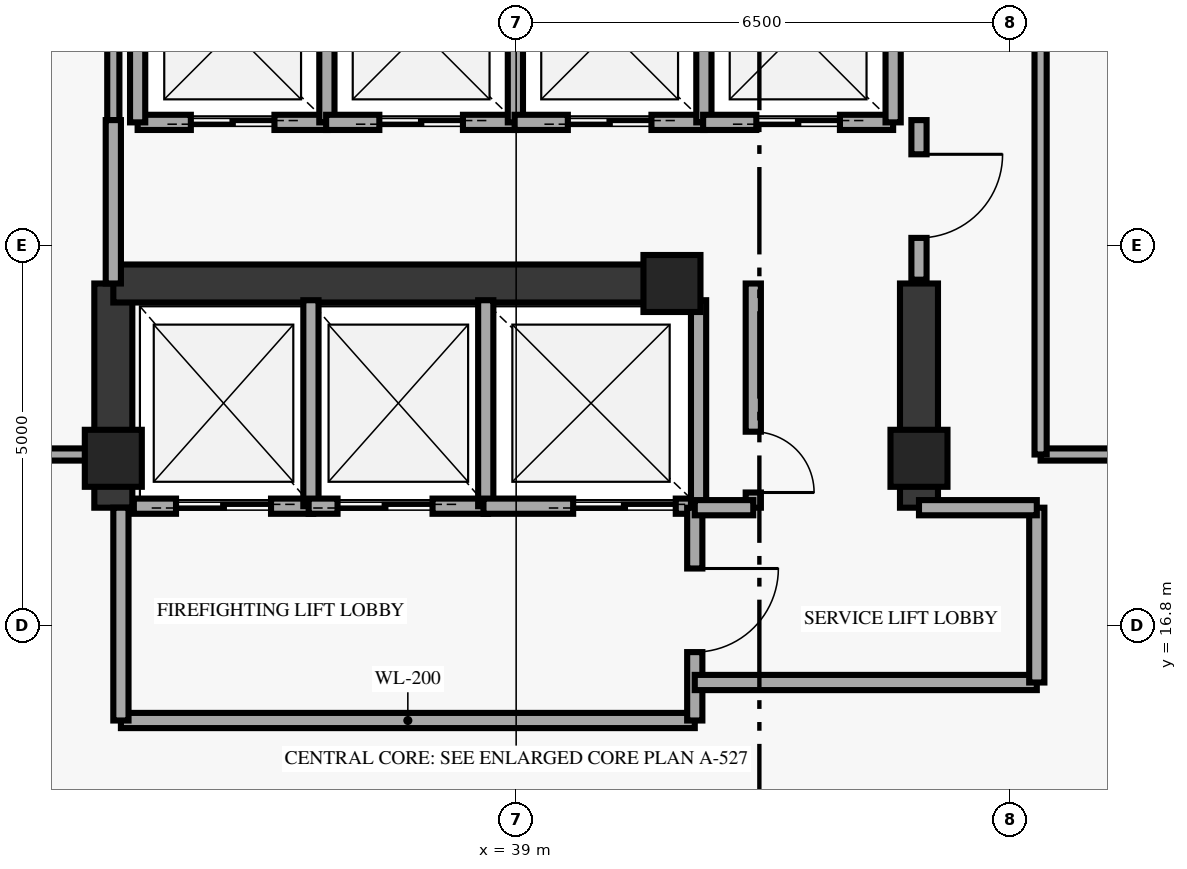
"""IFC4 building model, lengths in metres.
Left out: names, types, materials, properties, quantities, classifications, styles, units other than length and angle.
Written with IfcOpenShell. Run it as: python <this file> out.ifc"""

import sys

from ifc_helpers import new_model, si_unit, direction, frame, frame_2d, origin, origin_2d, place, context, subcontext, project, spatial, rectangle, extrude, element, fill, save


model = new_model("IFC4")
c1 = context("Model", 3, precision=1e-05, world=origin(), true_north=direction((0.0, 1.0)))
c2 = subcontext(c1, "Body", "Model", "MODEL_VIEW")
j1 = project(units=[si_unit("LENGTHUNIT", "METRE"), si_unit("PLANEANGLEUNIT", "RADIAN")], contexts=[c1])
p1 = place(None, origin())
s1 = spatial("IfcSite", under=j1, at=p1, CompositionType="ELEMENT")
p2 = place(p1, origin())
s2 = spatial("IfcBuilding", under=s1, at=p2, CompositionType="ELEMENT")
p3 = place(p2, frame((0.0, 0.0, 301.2)))
s3 = spatial("IfcBuildingStorey", under=s2, at=p3, CompositionType="ELEMENT", Elevation=301.2)
for number, where, z_axis, x_axis in (
    (1, (33.7, 19.0, 0.0), (0.0, 0.0, 1.0), (1.0, 0.0, 0.0)),
    (2, (41.05, 21.3, 0.0), (0.0, 0.0, 1.0), (1.0, 0.0, 0.0)),
    (3, (44.3, 19.0, 0.0), (0.0, 0.0, 1.0), (1.0, 0.0, 0.0)),
):
    element("IfcColumn", number, at=place(p3, frame(where, z_axis=z_axis, x_axis=x_axis)), inside=s3, PredefinedType="PILASTER", context=c2, shape_type="SweptSolid", body=[
        extrude(rectangle(XDim=0.75, YDim=0.75, at=origin_2d()), origin(), (0.0, 0.0, 1.0), 5.25),
    ])
for number, where, z_axis, x_axis in (
    (4, (33.7, 18.35, 0.0), (0.0, 0.0, 1.0), (0.0, 1.0, 0.0)),
    (5, (44.3, 18.35, 0.0), (0.0, 0.0, 1.0), (0.0, 1.0, 0.0)),
):
    element("IfcWall", number, at=place(p3, frame(where, z_axis=z_axis, x_axis=x_axis)), inside=s3, PredefinedType="SHEAR", context=c2, shape_type="SweptSolid", body=[
        extrude(rectangle(XDim=2.95, YDim=0.5, at=frame_2d((1.475, 0.0))), origin(), (0.0, 0.0, 1.0), 5.25),
    ])
p4 = place(p3, frame((33.7, 21.3, 0.0), z_axis=(0.0, 0.0, 1.0), x_axis=(1.0, 0.0, 0.0)))
e6 = element("IfcWall", 6, at=p4, inside=s3, PredefinedType="SHEAR", context=c2, shape_type="SweptSolid", body=[
    extrude(rectangle(XDim=7.55, YDim=0.5, at=frame_2d((3.775, 0.0))), origin(), (0.0, 0.0, 1.0), 5.25),
])
p5 = place(p3, frame((34.02, 23.42, 0.0), z_axis=(0.0, 0.0, 1.0), x_axis=(1.0, 0.0, 0.0)))
e7 = element("IfcWall", 7, at=p5, inside=s3, PredefinedType="SOLIDWALL", context=c2, shape_type="SweptSolid", body=[
    extrude(rectangle(XDim=2.5, YDim=0.2, at=frame_2d((1.25, 0.0))), origin(), (0.0, 0.0, 1.0), 5.25),
])
p6 = place(p5, frame((0.7, 0.0, 0.0)))
e8 = element("IfcOpeningElement", 8, at=p6, cuts=e7, PredefinedType="OPENING", context=c2, shape_type="SweptSolid", body=[
    extrude(rectangle(XDim=1.1, YDim=2.15, at=frame_2d((0.55, 1.075))), frame((0.0, 0.11, 0.0), z_axis=(0.0, -1.0, 0.0), x_axis=(1.0, 0.0, 0.0)), (0.0, 0.0, 1.0), 0.22),
])
for number, where, z_axis, x_axis in (
    (9, (34.02, 23.42, 0.0), (0.0, 0.0, 1.0), (0.0, 1.0, 0.0)),
    (10, (36.51, 23.42, 0.0), (0.0, 0.0, 1.0), (0.0, 1.0, 0.0)),
):
    element("IfcWall", number, at=place(p3, frame(where, z_axis=z_axis, x_axis=x_axis)), inside=s3, PredefinedType="SOLIDWALL", context=c2, shape_type="SweptSolid", body=[
        extrude(rectangle(XDim=2.41, YDim=0.2, at=frame_2d((1.205, 0.0))), origin(), (0.0, 0.0, 1.0), 5.25),
    ])
p7 = place(p3, frame((36.5, 23.42, 0.0), z_axis=(0.0, 0.0, 1.0), x_axis=(1.0, 0.0, 0.0)))
e11 = element("IfcWall", 11, at=p7, inside=s3, PredefinedType="SOLIDWALL", context=c2, shape_type="SweptSolid", body=[
    extrude(rectangle(XDim=2.5, YDim=0.2, at=frame_2d((1.25, 0.0))), origin(), (0.0, 0.0, 1.0), 5.25),
])
p8 = place(p7, frame((0.7, 0.0, 0.0)))
e12 = element("IfcOpeningElement", 12, at=p8, cuts=e11, PredefinedType="OPENING", context=c2, shape_type="SweptSolid", body=[
    extrude(rectangle(XDim=1.1, YDim=2.15, at=frame_2d((0.55, 1.075))), frame((0.0, 0.11, 0.0), z_axis=(0.0, -1.0, 0.0), x_axis=(1.0, 0.0, 0.0)), (0.0, 0.0, 1.0), 0.22),
])
p9 = place(p3, frame((38.99, 23.42, 0.0), z_axis=(0.0, 0.0, 1.0), x_axis=(0.0, 1.0, 0.0)))
e13 = element("IfcWall", 13, at=p9, inside=s3, PredefinedType="SOLIDWALL", context=c2, shape_type="SweptSolid", body=[
    extrude(rectangle(XDim=2.41, YDim=0.2, at=frame_2d((1.205, 0.0))), origin(), (0.0, 0.0, 1.0), 5.25),
])
p10 = place(p3, frame((38.98, 23.42, 0.0), z_axis=(0.0, 0.0, 1.0), x_axis=(1.0, 0.0, 0.0)))
e14 = element("IfcWall", 14, at=p10, inside=s3, PredefinedType="SOLIDWALL", context=c2, shape_type="SweptSolid", body=[
    extrude(rectangle(XDim=2.5, YDim=0.2, at=frame_2d((1.25, 0.0))), origin(), (0.0, 0.0, 1.0), 5.25),
])
p11 = place(p10, frame((0.7, 0.0, 0.0)))
e15 = element("IfcOpeningElement", 15, at=p11, cuts=e14, PredefinedType="OPENING", context=c2, shape_type="SweptSolid", body=[
    extrude(rectangle(XDim=1.1, YDim=2.15, at=frame_2d((0.55, 1.075))), frame((0.0, 0.11, 0.0), z_axis=(0.0, -1.0, 0.0), x_axis=(1.0, 0.0, 0.0)), (0.0, 0.0, 1.0), 0.22),
])
p12 = place(p3, frame((41.47, 23.42, 0.0), z_axis=(0.0, 0.0, 1.0), x_axis=(0.0, 1.0, 0.0)))
e16 = element("IfcWall", 16, at=p12, inside=s3, PredefinedType="SOLIDWALL", context=c2, shape_type="SweptSolid", body=[
    extrude(rectangle(XDim=2.41, YDim=0.2, at=frame_2d((1.205, 0.0))), origin(), (0.0, 0.0, 1.0), 5.25),
])
p13 = place(p3, frame((41.46, 23.42, 0.0), z_axis=(0.0, 0.0, 1.0), x_axis=(1.0, 0.0, 0.0)))
e17 = element("IfcWall", 17, at=p13, inside=s3, PredefinedType="SOLIDWALL", context=c2, shape_type="SweptSolid", body=[
    extrude(rectangle(XDim=2.5, YDim=0.2, at=frame_2d((1.25, 0.0))), origin(), (0.0, 0.0, 1.0), 5.25),
])
p14 = place(p13, frame((0.7, 0.0, 0.0)))
e18 = element("IfcOpeningElement", 18, at=p14, cuts=e17, PredefinedType="OPENING", context=c2, shape_type="SweptSolid", body=[
    extrude(rectangle(XDim=1.1, YDim=2.15, at=frame_2d((0.55, 1.075))), frame((0.0, 0.11, 0.0), z_axis=(0.0, -1.0, 0.0), x_axis=(1.0, 0.0, 0.0)), (0.0, 0.0, 1.0), 0.22),
])
p15 = place(p3, frame((43.96, 23.42, 0.0), z_axis=(0.0, 0.0, 1.0), x_axis=(0.0, 1.0, 0.0)))
e19 = element("IfcWall", 19, at=p15, inside=s3, PredefinedType="SOLIDWALL", context=c2, shape_type="SweptSolid", body=[
    extrude(rectangle(XDim=2.41, YDim=0.2, at=frame_2d((1.205, 0.0))), origin(), (0.0, 0.0, 1.0), 5.25),
])
p16 = place(p3, frame((33.97, 18.37, 0.0), z_axis=(0.0, 0.0, 1.0), x_axis=(1.0, 0.0, 0.0)))
e20 = element("IfcWall", 20, at=p16, inside=s3, PredefinedType="SOLIDWALL", context=c2, shape_type="SweptSolid", body=[
    extrude(rectangle(XDim=2.36, YDim=0.2, at=frame_2d((1.18, 0.0))), origin(), (0.0, 0.0, 1.0), 5.25),
])
p17 = place(p16, frame((0.555, 0.0, 0.0)))
e21 = element("IfcOpeningElement", 21, at=p17, cuts=e20, PredefinedType="OPENING", context=c2, shape_type="SweptSolid", body=[
    extrude(rectangle(XDim=1.25, YDim=2.2, at=frame_2d((0.625, 1.1))), frame((0.0, 0.11, 0.0), z_axis=(0.0, -1.0, 0.0), x_axis=(1.0, 0.0, 0.0)), (0.0, 0.0, 1.0), 0.22),
])
p18 = place(p3, frame((36.3, 18.37, 0.0), z_axis=(0.0, 0.0, 1.0), x_axis=(0.0, 1.0, 0.0)))
e22 = element("IfcWall", 22, at=p18, inside=s3, PredefinedType="SOLIDWALL", context=c2, shape_type="SweptSolid", body=[
    extrude(rectangle(XDim=2.71, YDim=0.2, at=frame_2d((1.355, 0.0))), origin(), (0.0, 0.0, 1.0), 5.25),
])
p19 = place(p3, frame((36.27, 18.37, 0.0), z_axis=(0.0, 0.0, 1.0), x_axis=(1.0, 0.0, 0.0)))
e23 = element("IfcWall", 23, at=p19, inside=s3, PredefinedType="SOLIDWALL", context=c2, shape_type="SweptSolid", body=[
    extrude(rectangle(XDim=2.36, YDim=0.2, at=frame_2d((1.18, 0.0))), origin(), (0.0, 0.0, 1.0), 5.25),
])
p20 = place(p19, frame((0.38, 0.0, 0.0)))
e24 = element("IfcOpeningElement", 24, at=p20, cuts=e23, PredefinedType="OPENING", context=c2, shape_type="SweptSolid", body=[
    extrude(rectangle(XDim=1.25, YDim=2.2, at=frame_2d((0.625, 1.1))), frame((0.0, 0.11, 0.0), z_axis=(0.0, -1.0, 0.0), x_axis=(1.0, 0.0, 0.0)), (0.0, 0.0, 1.0), 0.22),
])
p21 = place(p3, frame((38.6, 18.37, 0.0), z_axis=(0.0, 0.0, 1.0), x_axis=(0.0, 1.0, 0.0)))
e25 = element("IfcWall", 25, at=p21, inside=s3, PredefinedType="SOLIDWALL", context=c2, shape_type="SweptSolid", body=[
    extrude(rectangle(XDim=2.71, YDim=0.2, at=frame_2d((1.355, 0.0))), origin(), (0.0, 0.0, 1.0), 5.25),
])
p22 = place(p3, frame((38.57, 18.37, 0.0), z_axis=(0.0, 0.0, 1.0), x_axis=(1.0, 0.0, 0.0)))
e26 = element("IfcWall", 26, at=p22, inside=s3, PredefinedType="SOLIDWALL", context=c2, shape_type="SweptSolid", body=[
    extrude(rectangle(XDim=2.83, YDim=0.2, at=frame_2d((1.415, 0.0))), origin(), (0.0, 0.0, 1.0), 5.25),
])
p23 = place(p22, frame((1.18, 0.0, 0.0)))
e27 = element("IfcOpeningElement", 27, at=p23, cuts=e26, PredefinedType="OPENING", context=c2, shape_type="SweptSolid", body=[
    extrude(rectangle(XDim=1.35, YDim=2.18, at=frame_2d((0.675, 1.09))), frame((0.0, 0.11, 0.0), z_axis=(0.0, -1.0, 0.0), x_axis=(1.0, 0.0, 0.0)), (0.0, 0.0, 1.0), 0.22),
])
p24 = place(p3, frame((41.4, 18.37, 0.0), z_axis=(0.0, 0.0, 1.0), x_axis=(0.0, 1.0, 0.0)))
e28 = element("IfcWall", 28, at=p24, inside=s3, PredefinedType="SOLIDWALL", context=c2, shape_type="SweptSolid", body=[
    extrude(rectangle(XDim=2.71, YDim=0.2, at=frame_2d((1.355, 0.0))), origin(), (0.0, 0.0, 1.0), 5.25),
])
p25 = place(p3, frame((29.05, 19.05, 0.0), z_axis=(0.0, 0.0, 1.0), x_axis=(1.0, 0.0, 0.0)))
e29 = element("IfcWall", 29, at=p25, inside=s3, PredefinedType="PARTITIONING", context=c2, shape_type="SweptSolid", body=[
    extrude(rectangle(XDim=4.65, YDim=0.16, at=frame_2d((2.325, 0.0))), origin(), (0.0, 0.0, 1.0), 5.25),
])
p26 = place(p3, frame((33.7, 23.45, 0.0), z_axis=(0.0, 0.0, 1.0), x_axis=(0.0, 1.0, 0.0)))
e30 = element("IfcWall", 30, at=p26, inside=s3, PredefinedType="PARTITIONING", context=c2, shape_type="SweptSolid", body=[
    extrude(rectangle(XDim=2.67, YDim=0.16, at=frame_2d((1.335, 0.0))), origin(), (0.0, 0.0, 1.0), 4.635),
])
p27 = place(p3, frame((45.9, 19.05, 0.0), z_axis=(0.0, 0.0, 1.0), x_axis=(1.0, 0.0, 0.0)))
e31 = element("IfcWall", 31, at=p27, inside=s3, PredefinedType="PARTITIONING", context=c2, shape_type="SweptSolid", body=[
    extrude(rectangle(XDim=3.05, YDim=0.16, at=frame_2d((1.525, 0.0))), origin(), (0.0, 0.0, 1.0), 5.25),
])
p28 = place(p3, frame((45.9, 19.05, 0.0), z_axis=(0.0, 0.0, 1.0), x_axis=(0.0, 1.0, 0.0)))
e32 = element("IfcWall", 32, at=p28, inside=s3, PredefinedType="PARTITIONING", context=c2, shape_type="SweptSolid", body=[
    extrude(rectangle(XDim=7.07, YDim=0.16, at=frame_2d((3.535, 0.0))), origin(), (0.0, 0.0, 1.0), 5.25),
])
p29 = place(p3, frame((33.7, 21.3, 0.0), z_axis=(0.0, 0.0, 1.0), x_axis=(0.0, 1.0, 0.0)))
e33 = element("IfcWall", 33, at=p29, inside=s3, PredefinedType="SOLIDWALL", context=c2, shape_type="SweptSolid", body=[
    extrude(rectangle(XDim=2.15, YDim=0.2, at=frame_2d((1.075, 0.0))), origin(), (0.0, 0.0, 1.0), 4.635),
])
p30 = place(p3, frame((44.3, 21.35, 0.0), z_axis=(0.0, 0.0, 1.0), x_axis=(0.0, 1.0, 0.0)))
e34 = element("IfcWall", 34, at=p30, inside=s3, PredefinedType="SOLIDWALL", context=c2, shape_type="SweptSolid", body=[
    extrude(rectangle(XDim=2.1, YDim=0.2, at=frame_2d((1.05, 0.0))), origin(), (0.0, 0.0, 1.0), 4.635),
])
p31 = place(p30, frame((0.55, 0.0, 0.0)))
e35 = element("IfcOpeningElement", 35, at=p31, cuts=e34, PredefinedType="OPENING", context=c2, shape_type="SweptSolid", body=[
    extrude(rectangle(XDim=1.1, YDim=2.15, at=frame_2d((0.55, 1.075))), frame((0.0, 0.11, 0.0), z_axis=(0.0, -1.0, 0.0), x_axis=(1.0, 0.0, 0.0)), (0.0, 0.0, 1.0), 0.22),
])
p32 = place(p3, frame((33.8, 15.55, 0.0), z_axis=(0.0, 0.0, 1.0), x_axis=(1.0, 0.0, 0.0)))
e36 = element("IfcWall", 36, at=p32, inside=s3, PredefinedType="SOLIDWALL", context=c2, shape_type="SweptSolid", body=[
    extrude(rectangle(XDim=7.55, YDim=0.2, at=frame_2d((3.775, 0.0))), origin(), (0.0, 0.0, 1.0), 5.25),
])
p33 = place(p3, frame((33.8, 15.55, 0.0), z_axis=(0.0, 0.0, 1.0), x_axis=(0.0, 1.0, 0.0)))
e37 = element("IfcWall", 37, at=p33, inside=s3, PredefinedType="SOLIDWALL", context=c2, shape_type="SweptSolid", body=[
    extrude(rectangle(XDim=2.8, YDim=0.2, at=frame_2d((1.4, 0.0))), origin(), (0.0, 0.0, 1.0), 5.25),
])
p34 = place(p3, frame((41.35, 15.55, 0.0), z_axis=(0.0, 0.0, 1.0), x_axis=(0.0, 1.0, 0.0)))
e38 = element("IfcWall", 38, at=p34, inside=s3, PredefinedType="SOLIDWALL", context=c2, shape_type="SweptSolid", body=[
    extrude(rectangle(XDim=2.8, YDim=0.2, at=frame_2d((1.4, 0.0))), origin(), (0.0, 0.0, 1.0), 5.25),
])
p35 = place(p34, frame((0.9, 0.0, 0.0)))
e39 = element("IfcOpeningElement", 39, at=p35, cuts=e38, PredefinedType="OPENING", context=c2, shape_type="SweptSolid", body=[
    extrude(rectangle(XDim=1.1, YDim=2.15, at=frame_2d((0.55, 1.075))), frame((0.0, 0.11, 0.0), z_axis=(0.0, -1.0, 0.0), x_axis=(1.0, 0.0, 0.0)), (0.0, 0.0, 1.0), 0.22),
])
p36 = place(p3, frame((41.35, 16.05, 0.0), z_axis=(0.0, 0.0, 1.0), x_axis=(1.0, 0.0, 0.0)))
e40 = element("IfcWall", 40, at=p36, inside=s3, PredefinedType="SOLIDWALL", context=c2, shape_type="SweptSolid", body=[
    extrude(rectangle(XDim=4.5, YDim=0.2, at=frame_2d((2.25, 0.0))), origin(), (0.0, 0.0, 1.0), 5.25),
])
p37 = place(p3, frame((45.85, 16.05, 0.0), z_axis=(0.0, 0.0, 1.0), x_axis=(0.0, 1.0, 0.0)))
e41 = element("IfcWall", 41, at=p37, inside=s3, PredefinedType="SOLIDWALL", context=c2, shape_type="SweptSolid", body=[
    extrude(rectangle(XDim=2.3, YDim=0.2, at=frame_2d((1.15, 0.0))), origin(), (0.0, 0.0, 1.0), 5.25),
])
p38 = place(p3, frame((44.3, 18.35, 0.0), z_axis=(0.0, 0.0, 1.0), x_axis=(1.0, 0.0, 0.0)))
e42 = element("IfcWall", 42, at=p38, inside=s3, PredefinedType="SOLIDWALL", context=c2, shape_type="SweptSolid", body=[
    extrude(rectangle(XDim=1.55, YDim=0.2, at=frame_2d((0.775, 0.0))), origin(), (0.0, 0.0, 1.0), 5.25),
])
p39 = place(p3, frame((42.12, 18.35, 0.0), z_axis=(0.0, 0.0, 1.0), x_axis=(0.0, 1.0, 0.0)))
e43 = element("IfcWall", 43, at=p39, inside=s3, PredefinedType="SOLIDWALL", context=c2, shape_type="SweptSolid", body=[
    extrude(rectangle(XDim=2.95, YDim=0.2, at=frame_2d((1.475, 0.0))), origin(), (0.0, 0.0, 1.0), 5.25),
])
p40 = place(p39, frame((0.2, 0.0, 0.0)))
e44 = element("IfcOpeningElement", 44, at=p40, cuts=e43, PredefinedType="OPENING", context=c2, shape_type="SweptSolid", body=[
    extrude(rectangle(XDim=0.8, YDim=2.05, at=frame_2d((0.4, 1.025))), frame((0.0, 0.11, 0.0), z_axis=(0.0, -1.0, 0.0), x_axis=(1.0, 0.0, 0.0)), (0.0, 0.0, 1.0), 0.22),
])
p41 = place(p3, frame((41.35, 18.35, 0.0), z_axis=(0.0, 0.0, 1.0), x_axis=(1.0, 0.0, 0.0)))
e45 = element("IfcWall", 45, at=p41, inside=s3, PredefinedType="SOLIDWALL", context=c2, shape_type="SweptSolid", body=[
    extrude(rectangle(XDim=0.77, YDim=0.2, at=frame_2d((0.385, 0.0))), origin(), (0.0, 0.0, 1.0), 5.25),
])
p42 = place(p3, frame((44.369, 13.295, 0.0), z_axis=(0.0, 0.0, 1.0), x_axis=(0.898488801633, 0.43899643887, 0.0)))
e46 = element("IfcWall", 46, at=p42, inside=s3, PredefinedType="PARTITIONING", context=c2, shape_type="SweptSolid", body=[
    extrude(rectangle(XDim=4.836, YDim=0.16, at=frame_2d((2.418, 0.0))), origin(), (0.0, 0.0, 1.0), 5.25),
])
p43 = place(p6, origin())
e47 = element("IfcDoor", 47, at=p43, inside=s3, OperationType="DOUBLE_DOOR_SLIDING", PredefinedType="DOOR", context=c2, shape_type="SweptSolid", body=[
    extrude(rectangle(XDim=1.1, YDim=2.15, at=frame_2d((0.55, 1.075))), frame((0.0, 0.025, 0.0), z_axis=(0.0, -1.0, 0.0), x_axis=(1.0, 0.0, 0.0)), (0.0, 0.0, 1.0), 0.05),
])
fill(e8, e47)
p44 = place(p8, origin())
e48 = element("IfcDoor", 48, at=p44, inside=s3, OperationType="DOUBLE_DOOR_SLIDING", PredefinedType="DOOR", context=c2, shape_type="SweptSolid", body=[
    extrude(rectangle(XDim=1.1, YDim=2.15, at=frame_2d((0.55, 1.075))), frame((0.0, 0.025, 0.0), z_axis=(0.0, -1.0, 0.0), x_axis=(1.0, 0.0, 0.0)), (0.0, 0.0, 1.0), 0.05),
])
fill(e12, e48)
p45 = place(p11, origin())
e49 = element("IfcDoor", 49, at=p45, inside=s3, OperationType="DOUBLE_DOOR_SLIDING", PredefinedType="DOOR", context=c2, shape_type="SweptSolid", body=[
    extrude(rectangle(XDim=1.1, YDim=2.15, at=frame_2d((0.55, 1.075))), frame((0.0, 0.025, 0.0), z_axis=(0.0, -1.0, 0.0), x_axis=(1.0, 0.0, 0.0)), (0.0, 0.0, 1.0), 0.05),
])
fill(e15, e49)
p46 = place(p14, origin())
e50 = element("IfcDoor", 50, at=p46, inside=s3, OperationType="DOUBLE_DOOR_SLIDING", PredefinedType="DOOR", context=c2, shape_type="SweptSolid", body=[
    extrude(rectangle(XDim=1.1, YDim=2.15, at=frame_2d((0.55, 1.075))), frame((0.0, 0.025, 0.0), z_axis=(0.0, -1.0, 0.0), x_axis=(1.0, 0.0, 0.0)), (0.0, 0.0, 1.0), 0.05),
])
fill(e18, e50)
p47 = place(p17, origin())
e51 = element("IfcDoor", 51, at=p47, inside=s3, OperationType="DOUBLE_DOOR_SLIDING", PredefinedType="DOOR", context=c2, shape_type="SweptSolid", body=[
    extrude(rectangle(XDim=1.25, YDim=2.2, at=frame_2d((0.625, 1.1))), frame((0.0, 0.025, 0.0), z_axis=(0.0, -1.0, 0.0), x_axis=(1.0, 0.0, 0.0)), (0.0, 0.0, 1.0), 0.05),
])
fill(e21, e51)
p48 = place(p20, origin())
e52 = element("IfcDoor", 52, at=p48, inside=s3, OperationType="DOUBLE_DOOR_SLIDING", PredefinedType="DOOR", context=c2, shape_type="SweptSolid", body=[
    extrude(rectangle(XDim=1.25, YDim=2.2, at=frame_2d((0.625, 1.1))), frame((0.0, 0.025, 0.0), z_axis=(0.0, -1.0, 0.0), x_axis=(1.0, 0.0, 0.0)), (0.0, 0.0, 1.0), 0.05),
])
fill(e24, e52)
p49 = place(p23, origin())
e53 = element("IfcDoor", 53, at=p49, inside=s3, OperationType="DOUBLE_DOOR_SLIDING", PredefinedType="DOOR", context=c2, shape_type="SweptSolid", body=[
    extrude(rectangle(XDim=1.35, YDim=2.18, at=frame_2d((0.675, 1.09))), frame((0.0, 0.025, 0.0), z_axis=(0.0, -1.0, 0.0), x_axis=(1.0, 0.0, 0.0)), (0.0, 0.0, 1.0), 0.05),
])
fill(e27, e53)
p50 = place(p31, origin())
e54 = element("IfcDoor", 54, at=p50, inside=s3, OperationType="SINGLE_SWING_RIGHT", PredefinedType="DOOR", context=c2, shape_type="SweptSolid", body=[
    extrude(rectangle(XDim=1.1, YDim=2.15, at=frame_2d((0.55, 1.075))), frame((0.0, 0.025, 0.0), z_axis=(0.0, -1.0, 0.0), x_axis=(1.0, 0.0, 0.0)), (0.0, 0.0, 1.0), 0.05),
])
fill(e35, e54)
p51 = place(p35, origin())
e55 = element("IfcDoor", 55, at=p51, inside=s3, OperationType="SINGLE_SWING_RIGHT", PredefinedType="DOOR", context=c2, shape_type="SweptSolid", body=[
    extrude(rectangle(XDim=1.1, YDim=2.15, at=frame_2d((0.55, 1.075))), frame((0.0, 0.025, 0.0), z_axis=(0.0, -1.0, 0.0), x_axis=(1.0, 0.0, 0.0)), (0.0, 0.0, 1.0), 0.05),
])
fill(e39, e55)
p52 = place(p40, origin())
e56 = element("IfcDoor", 56, at=p52, inside=s3, OperationType="SINGLE_SWING_LEFT", PredefinedType="DOOR", context=c2, shape_type="SweptSolid", body=[
    extrude(rectangle(XDim=0.8, YDim=2.05, at=frame_2d((0.4, 1.025))), frame((0.0, 0.025, 0.0), z_axis=(0.0, -1.0, 0.0), x_axis=(1.0, 0.0, 0.0)), (0.0, 0.0, 1.0), 0.05),
])
fill(e44, e56)
save(model, sys.argv[1])
